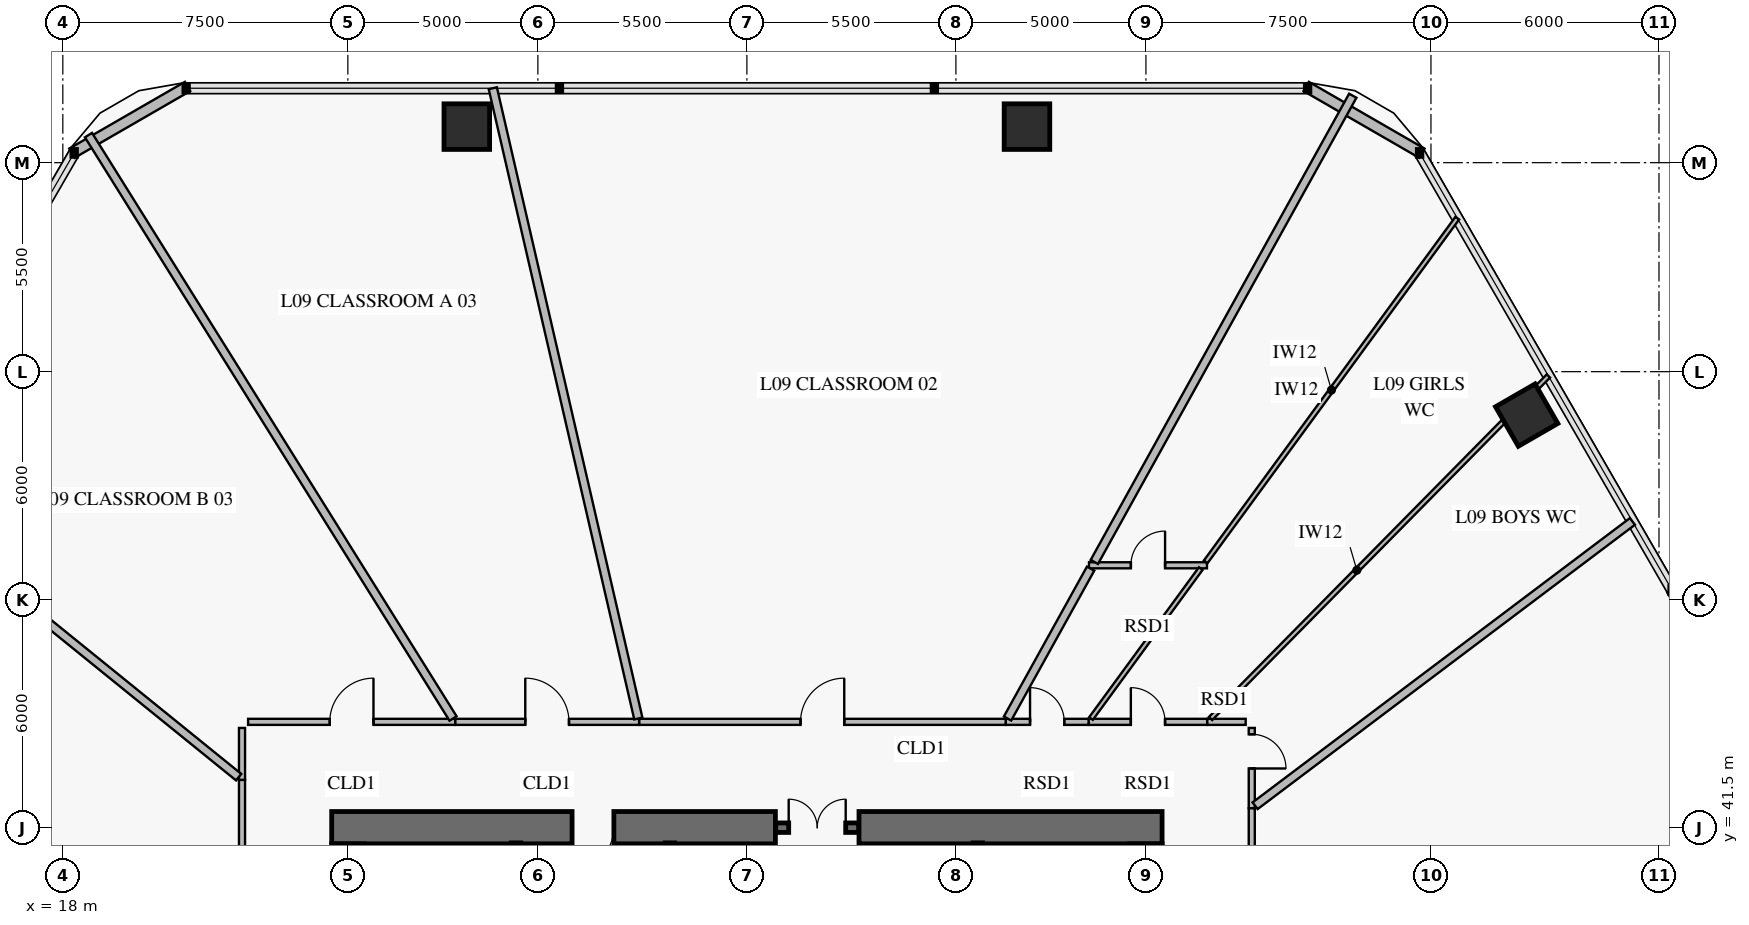
"""IFC4 building model, lengths in metres.
Left out: names, types, materials, properties, quantities, classifications, styles, units other than length and angle.
Written with IfcOpenShell. Run it as: python <this file> out.ifc"""

import sys

from ifc_helpers import new_model, si_unit, direction, frame, frame_2d, origin, origin_2d, place, context, subcontext, project, spatial, rectangle, extrude, element, fill, save


model = new_model("IFC4")
c1 = context("Model", 3, precision=1e-05, world=origin(), true_north=direction((0.0, 1.0)))
c2 = subcontext(c1, "Body", "Model", "MODEL_VIEW")
j1 = project(units=[si_unit("LENGTHUNIT", "METRE"), si_unit("PLANEANGLEUNIT", "RADIAN")], contexts=[c1])
p1 = place(None, origin())
s1 = spatial("IfcSite", under=j1, at=p1, CompositionType="ELEMENT")
p2 = place(p1, origin())
s2 = spatial("IfcBuilding", under=s1, at=p2, CompositionType="ELEMENT")
p3 = place(p2, frame((0.0, 0.0, 37.2)))
s3 = spatial("IfcBuildingStorey", under=s2, at=p3, CompositionType="ELEMENT", Elevation=37.2)
p4 = place(p3, frame((46.925, 41.5, 0.0), z_axis=(0.0, 0.0, 1.0), x_axis=(-1.0, 0.0, 0.0)))
e1 = element("IfcWall", 1, at=p4, inside=s3, PredefinedType="SHEAR", context=c2, shape_type="SweptSolid", body=[
    extrude(rectangle(XDim=7.975, YDim=0.85, at=frame_2d((3.988, 0.0))), origin(), (0.0, 0.0, 1.0), 4.2),
])
p5 = place(p3, frame((36.75, 41.5, 0.0), z_axis=(0.0, 0.0, 1.0), x_axis=(-1.0, 0.0, 0.0)))
e2 = element("IfcWall", 2, at=p5, inside=s3, PredefinedType="SHEAR", context=c2, shape_type="SweptSolid", body=[
    extrude(rectangle(XDim=11.675, YDim=0.85, at=frame_2d((5.837, 0.0))), origin(), (0.0, 0.0, 1.0), 4.2),
])
p6 = place(p5, frame((4.25, 0.0, 0.0)))
e3 = element("IfcOpeningElement", 3, at=p6, cuts=e2, PredefinedType="OPENING", context=c2, shape_type="SweptSolid", body=[
    extrude(rectangle(XDim=1.1, YDim=2.15, at=frame_2d((0.55, 1.075))), frame((0.0, 0.437, 0.0), z_axis=(0.0, -1.0, 0.0), x_axis=(1.0, 0.0, 0.0)), (0.0, 0.0, 1.0), 0.874),
])
p7 = place(p3, frame((25.5, 22.925, 0.0), z_axis=(0.0, 0.0, 1.0), x_axis=(0.0, 1.0, 0.0)))
e4 = element("IfcWall", 4, at=p7, inside=s3, PredefinedType="SHEAR", context=c2, shape_type="SweptSolid", body=[
    extrude(rectangle(XDim=18.15, YDim=0.85, at=frame_2d((9.075, 0.0))), origin(), (0.0, 0.0, 1.0), 4.2),
])
p8 = place(p7, frame((8.825, 0.0, 0.0)))
e5 = element("IfcOpeningElement", 5, at=p8, cuts=e4, PredefinedType="OPENING", context=c2, shape_type="SweptSolid", body=[
    extrude(rectangle(XDim=1.1, YDim=2.15, at=frame_2d((0.55, 1.075))), frame((0.0, 0.437, 0.0), z_axis=(0.0, -1.0, 0.0), x_axis=(1.0, 0.0, 0.0)), (0.0, 0.0, 1.0), 0.874),
])
p9 = place(p3, frame((46.5, 22.925, 0.0), z_axis=(0.0, 0.0, 1.0), x_axis=(0.0, 1.0, 0.0)))
e6 = element("IfcWall", 6, at=p9, inside=s3, PredefinedType="SHEAR", context=c2, shape_type="SweptSolid", body=[
    extrude(rectangle(XDim=18.15, YDim=0.85, at=frame_2d((9.075, 0.0))), origin(), (0.0, 0.0, 1.0), 4.2),
])
p10 = place(p9, frame((8.825, 0.0, 0.0)))
e7 = element("IfcOpeningElement", 7, at=p10, cuts=e6, PredefinedType="OPENING", context=c2, shape_type="SweptSolid", body=[
    extrude(rectangle(XDim=1.1, YDim=2.15, at=frame_2d((0.55, 1.075))), frame((0.0, 0.437, 0.0), z_axis=(0.0, -1.0, 0.0), x_axis=(1.0, 0.0, 0.0)), (0.0, 0.0, 1.0), 0.874),
])
for number, where, z_axis, x_axis in (
    (8, (56.519, 52.357, 0.0), (0.0, 0.0, 1.0), (-0.5, 0.866, 0.0)),
    (9, (43.37, 59.948, 0.0), (0.0, 0.0, 1.0), (-1.0, 0.0, 0.0)),
    (10, (28.63, 59.948, 0.0), (0.0, 0.0, 1.0), (-1.0, 0.0, 0.0)),
):
    element("IfcColumn", number, at=place(p3, frame(where, z_axis=z_axis, x_axis=x_axis)), inside=s3, PredefinedType="COLUMN", context=c2, shape_type="SweptSolid", body=[
        extrude(rectangle(XDim=1.2, YDim=1.2, at=origin_2d()), origin(), (0.0, 0.0, 1.0), 3.92),
    ])
for number, where, z_axis, x_axis in (
    (11, (18.239, 59.249, 0.0), (0.0, 0.0, 1.0), (0.866, 0.5, 0.0)),
    (12, (50.717, 61.006, 0.0), (0.0, 0.0, 1.0), (0.866, -0.5, 0.0)),
):
    element("IfcWall", number, at=place(p3, frame(where, z_axis=z_axis, x_axis=x_axis)), inside=s3, PredefinedType="SOLIDWALL", context=c2, shape_type="SweptSolid", body=[
        extrude(rectangle(XDim=3.515, YDim=0.28, at=frame_2d((1.757, 0.0))), origin(), (0.0, 0.0, 1.0), 3.92),
    ])
p11 = place(p3, frame((60.344, 47.752, 0.0), z_axis=(0.0, 0.0, 1.0), x_axis=(0.500024377727, -0.866011328839, 0.0)))
e13 = element("IfcWall", 13, at=p11, inside=s3, PredefinedType="SOLIDWALL", context=c2, shape_type="SweptSolid", body=[
    extrude(rectangle(XDim=2.94, YDim=0.28, at=frame_2d((1.47, 0.0))), origin(), (0.0, 0.0, 1.0), 3.92),
])
p12 = place(p11, frame((0.42, 0.0, 0.7)))
e14 = element("IfcOpeningElement", 14, at=p12, cuts=e13, PredefinedType="OPENING", context=c2, shape_type="SweptSolid", body=[
    extrude(rectangle(XDim=2.1, YDim=1.5, at=frame_2d((1.05, 0.75))), frame((0.0, 0.152, 0.0), z_axis=(0.0, -1.0, 0.0), x_axis=(1.0, 0.0, 0.0)), (0.0, 0.0, 1.0), 0.304),
])
p13 = place(p3, frame((36.76, 41.5, 0.0), z_axis=(0.0, 0.0, 1.0), x_axis=(1.0, 0.0, 0.0)))
e15 = element("IfcWall", 15, at=p13, inside=s3, PredefinedType="SOLIDWALL", context=c2, shape_type="SweptSolid", body=[
    extrude(rectangle(XDim=2.18, YDim=0.25, at=frame_2d((1.09, 0.0))), origin(), (0.0, 0.0, 1.0), 4.2),
])
p14 = place(p13, frame((0.34, 0.0, 0.0)))
e16 = element("IfcOpeningElement", 16, at=p14, cuts=e15, PredefinedType="OPENING", context=c2, shape_type="SweptSolid", body=[
    extrude(rectangle(XDim=1.5, YDim=2.15, at=frame_2d((0.75, 1.075))), frame((0.0, 0.137, 0.0), z_axis=(0.0, -1.0, 0.0), x_axis=(1.0, 0.0, 0.0)), (0.0, 0.0, 1.0), 0.274),
])
for number, where, z_axis, x_axis in (
    (17, (29.925, 31.4, 0.0), (0.0, 0.0, 1.0), (0.0, 1.0, 0.0)),
    (18, (33.975, 31.4, 0.0), (0.0, 0.0, 1.0), (0.0, 1.0, 0.0)),
    (19, (42.075, 31.4, 0.0), (0.0, 0.0, 1.0), (0.0, 1.0, 0.0)),
):
    element("IfcWall", number, at=place(p3, frame(where, z_axis=z_axis, x_axis=x_axis)), inside=s3, PredefinedType="SOLIDWALL", context=c2, shape_type="SweptSolid", body=[
        extrude(rectangle(XDim=9.7, YDim=0.25, at=frame_2d((4.85, 0.0))), origin(), (0.0, 0.0, 1.0), 4.2),
    ])
p15 = place(p3, frame((49.285, 42.011, 0.0), z_axis=(0.0, 0.0, 1.0), x_axis=(0.0, 1.0, 0.0)))
e20 = element("IfcWall", 20, at=p15, inside=s3, PredefinedType="PARTITIONING", context=c2, shape_type="SweptSolid", body=[
    extrude(rectangle(XDim=2.114, YDim=0.16, at=frame_2d((1.057, 0.0))), origin(), (0.0, 0.0, 1.0), 3.92),
])
p16 = place(p15, frame((1.047, 0.0, 0.0)))
e21 = element("IfcOpeningElement", 21, at=p16, cuts=e20, PredefinedType="OPENING", context=c2, shape_type="SweptSolid", body=[
    extrude(rectangle(XDim=0.9, YDim=2.1, at=frame_2d((0.45, 1.05))), frame((0.0, 0.092, 0.0), z_axis=(0.0, -1.0, 0.0), x_axis=(1.0, 0.0, 0.0)), (0.0, 0.0, 1.0), 0.184),
])
p17 = place(p3, frame((48.115, 44.285, 0.0), z_axis=(0.0, 0.0, 1.0), x_axis=(-1.0, 0.0, 0.0)))
e22 = element("IfcWall", 22, at=p17, inside=s3, PredefinedType="PARTITIONING", context=c2, shape_type="SweptSolid", body=[
    extrude(rectangle(XDim=3.124, YDim=0.16, at=frame_2d((1.562, 0.0))), origin(), (0.0, 0.0, 1.0), 3.92),
])
p18 = place(p17, frame((1.112, 0.0, 0.0)))
e23 = element("IfcOpeningElement", 23, at=p18, cuts=e22, PredefinedType="OPENING", context=c2, shape_type="SweptSolid", body=[
    extrude(rectangle(XDim=0.9, YDim=2.1, at=frame_2d((0.45, 1.05))), frame((0.0, 0.092, 0.0), z_axis=(0.0, -1.0, 0.0), x_axis=(1.0, 0.0, 0.0)), (0.0, 0.0, 1.0), 0.184),
])
p19 = place(p3, frame((45.002, 48.405, 0.0), z_axis=(0.0, 0.0, 1.0), x_axis=(1.0, 0.0, 0.0)))
e24 = element("IfcWall", 24, at=p19, inside=s3, PredefinedType="PARTITIONING", context=c2, shape_type="SweptSolid", body=[
    extrude(rectangle(XDim=3.104, YDim=0.16, at=frame_2d((1.552, 0.0))), origin(), (0.0, 0.0, 1.0), 3.92),
])
p20 = place(p19, frame((1.102, 0.0, 0.0)))
e25 = element("IfcOpeningElement", 25, at=p20, cuts=e24, PredefinedType="OPENING", context=c2, shape_type="SweptSolid", body=[
    extrude(rectangle(XDim=0.9, YDim=2.1, at=frame_2d((0.45, 1.05))), frame((0.0, 0.092, 0.0), z_axis=(0.0, -1.0, 0.0), x_axis=(1.0, 0.0, 0.0)), (0.0, 0.0, 1.0), 0.184),
])
p21 = place(p3, frame((44.991, 44.285, 0.0), z_axis=(0.0, 0.0, 1.0), x_axis=(-1.0, 0.0, 0.0)))
e26 = element("IfcWall", 26, at=p21, inside=s3, PredefinedType="PARTITIONING", context=c2, shape_type="SweptSolid", body=[
    extrude(rectangle(XDim=2.181, YDim=0.16, at=frame_2d((1.091, 0.0))), origin(), (0.0, 0.0, 1.0), 3.92),
])
p22 = place(p21, frame((0.641, 0.0, 0.0)))
e27 = element("IfcOpeningElement", 27, at=p22, cuts=e26, PredefinedType="OPENING", context=c2, shape_type="SweptSolid", body=[
    extrude(rectangle(XDim=0.9, YDim=2.1, at=frame_2d((0.45, 1.05))), frame((0.0, 0.092, 0.0), z_axis=(0.0, -1.0, 0.0), x_axis=(1.0, 0.0, 0.0)), (0.0, 0.0, 1.0), 0.184),
])
p23 = place(p3, frame((42.81, 44.285, 0.0), z_axis=(0.0, 0.0, 1.0), x_axis=(-1.0, 0.0, 0.0)))
e28 = element("IfcWall", 28, at=p23, inside=s3, PredefinedType="PARTITIONING", context=c2, shape_type="SweptSolid", body=[
    extrude(rectangle(XDim=9.646, YDim=0.16, at=frame_2d((4.823, 0.0))), origin(), (0.0, 0.0, 1.0), 3.22),
])
p24 = place(p23, frame((4.248, 0.0, 0.0)))
e29 = element("IfcOpeningElement", 29, at=p24, cuts=e28, PredefinedType="OPENING", context=c2, shape_type="SweptSolid", body=[
    extrude(rectangle(XDim=1.15, YDim=2.2, at=frame_2d((0.575, 1.1))), frame((0.0, 0.092, 0.0), z_axis=(0.0, -1.0, 0.0), x_axis=(1.0, 0.0, 0.0)), (0.0, 0.0, 1.0), 0.184),
])
p25 = place(p3, frame((33.164, 44.285, 0.0), z_axis=(0.0, 0.0, 1.0), x_axis=(-1.0, 0.0, 0.0)))
e30 = element("IfcWall", 30, at=p25, inside=s3, PredefinedType="PARTITIONING", context=c2, shape_type="SweptSolid", body=[
    extrude(rectangle(XDim=4.84, YDim=0.16, at=frame_2d((2.42, 0.0))), origin(), (0.0, 0.0, 1.0), 3.22),
])
p26 = place(p25, frame((1.845, 0.0, 0.0)))
e31 = element("IfcOpeningElement", 31, at=p26, cuts=e30, PredefinedType="OPENING", context=c2, shape_type="SweptSolid", body=[
    extrude(rectangle(XDim=1.15, YDim=2.2, at=frame_2d((0.575, 1.1))), frame((0.0, 0.092, 0.0), z_axis=(0.0, -1.0, 0.0), x_axis=(1.0, 0.0, 0.0)), (0.0, 0.0, 1.0), 0.184),
])
p27 = place(p3, frame((28.323, 44.285, 0.0), z_axis=(0.0, 0.0, 1.0), x_axis=(-1.0, 0.0, 0.0)))
e32 = element("IfcWall", 32, at=p27, inside=s3, PredefinedType="PARTITIONING", context=c2, shape_type="SweptSolid", body=[
    extrude(rectangle(XDim=5.448, YDim=0.16, at=frame_2d((2.724, 0.0))), origin(), (0.0, 0.0, 1.0), 3.22),
])
p28 = place(p27, frame((2.149, 0.0, 0.0)))
e33 = element("IfcOpeningElement", 33, at=p28, cuts=e32, PredefinedType="OPENING", context=c2, shape_type="SweptSolid", body=[
    extrude(rectangle(XDim=1.15, YDim=2.2, at=frame_2d((0.575, 1.1))), frame((0.0, 0.092, 0.0), z_axis=(0.0, -1.0, 0.0), x_axis=(1.0, 0.0, 0.0)), (0.0, 0.0, 1.0), 0.184),
])
p29 = place(p3, frame((22.715, 42.758, 0.0), z_axis=(0.0, 0.0, 1.0), x_axis=(0.0, -1.0, 0.0)))
e34 = element("IfcWall", 34, at=p29, inside=s3, PredefinedType="PARTITIONING", context=c2, shape_type="SweptSolid", body=[
    extrude(rectangle(XDim=11.454, YDim=0.16, at=frame_2d((5.727, 0.0))), origin(), (0.0, 0.0, 1.0), 3.22),
])
p30 = place(p29, frame((5.152, 0.0, 0.0)))
e35 = element("IfcOpeningElement", 35, at=p30, cuts=e34, PredefinedType="OPENING", context=c2, shape_type="SweptSolid", body=[
    extrude(rectangle(XDim=1.15, YDim=2.2, at=frame_2d((0.575, 1.1))), frame((0.0, 0.092, 0.0), z_axis=(0.0, -1.0, 0.0), x_axis=(1.0, 0.0, 0.0)), (0.0, 0.0, 1.0), 0.184),
])
p31 = place(p3, frame((49.285, 29.896, 0.0), z_axis=(0.0, 0.0, 1.0), x_axis=(0.0, 1.0, 0.0)))
e36 = element("IfcWall", 36, at=p31, inside=s3, PredefinedType="PARTITIONING", context=c2, shape_type="SweptSolid", body=[
    extrude(rectangle(XDim=12.115, YDim=0.16, at=frame_2d((6.058, 0.0))), origin(), (0.0, 0.0, 1.0), 3.22),
])
p32 = place(p31, frame((5.583, 0.0, 0.0)))
e37 = element("IfcOpeningElement", 37, at=p32, cuts=e36, PredefinedType="OPENING", context=c2, shape_type="SweptSolid", body=[
    extrude(rectangle(XDim=0.95, YDim=2.1, at=frame_2d((0.475, 1.05))), frame((0.0, 0.092, 0.0), z_axis=(0.0, -1.0, 0.0), x_axis=(1.0, 0.0, 0.0)), (0.0, 0.0, 1.0), 0.184),
])
p33 = place(p3, frame((49.373, 42.077, 0.0), z_axis=(0.0, 0.0, 1.0), x_axis=(0.798630996951, 0.601821012187, 0.0)))
e38 = element("IfcWall", 38, at=p33, inside=s3, PredefinedType="PARTITIONING", context=c2, shape_type="SweptSolid", body=[
    extrude(rectangle(XDim=12.431, YDim=0.22, at=frame_2d((6.215, 0.0))), origin(), (0.0, 0.0, 1.0), 3.17),
])
p34 = place(p3, frame((49.125, 44.285, 0.0), z_axis=(0.0, 0.0, 1.0), x_axis=(-1.0, 0.0, 0.0)))
e39 = element("IfcWall", 39, at=p34, inside=s3, PredefinedType="PARTITIONING", context=c2, shape_type="SweptSolid", body=[
    extrude(rectangle(XDim=1.01, YDim=0.16, at=frame_2d((0.505, 0.0))), origin(), (0.0, 0.0, 1.0), 3.22),
])
p35 = place(p3, frame((48.201, 44.373, 0.0), z_axis=(0.0, 0.0, 1.0), x_axis=(0.702156728527, 0.712022421405, 0.0)))
e40 = element("IfcWall", 40, at=p35, inside=s3, PredefinedType="PARTITIONING", context=c2, shape_type="SweptSolid", body=[
    extrude(rectangle(XDim=10.963, YDim=0.12, at=frame_2d((5.481, 0.0))), origin(), (0.0, 0.0, 1.0), 3.22),
])
p36 = place(p3, frame((56.686, 52.977, 0.0), z_axis=(0.0, 0.0, 1.0), x_axis=(0.702004585151, 0.712172424646, 0.0)))
e41 = element("IfcWall", 41, at=p36, inside=s3, PredefinedType="PARTITIONING", context=c2, shape_type="SweptSolid", body=[
    extrude(rectangle(XDim=0.576, YDim=0.12, at=frame_2d((0.288, 0.0))), origin(), (0.0, 0.0, 1.0), 3.492),
])
p37 = place(p3, frame((45.056, 44.373, 0.0), z_axis=(0.0, 0.0, 1.0), x_axis=(0.590607595118, 0.806958901425, 0.0)))
e42 = element("IfcWall", 42, at=p37, inside=s3, PredefinedType="PARTITIONING", context=c2, shape_type="SweptSolid", body=[
    extrude(rectangle(XDim=4.887, YDim=0.12, at=frame_2d((2.444, 0.0))), origin(), (0.0, 0.0, 1.0), 3.92),
])
p38 = place(p3, frame((48.071, 48.493, 0.0), z_axis=(0.0, 0.0, 1.0), x_axis=(0.590600620108, 0.80696400634, 0.0)))
e43 = element("IfcWall", 43, at=p38, inside=s3, PredefinedType="PARTITIONING", context=c2, shape_type="SweptSolid", body=[
    extrude(rectangle(XDim=11.212, YDim=0.12, at=frame_2d((5.606, 0.0))), origin(), (0.0, 0.0, 1.0), 3.17),
])
p39 = place(p3, frame((42.858, 44.373, 0.0), z_axis=(0.0, 0.0, 1.0), x_axis=(0.484838262691, 0.87460382976, 0.0)))
e44 = element("IfcWall", 44, at=p39, inside=s3, PredefinedType="PARTITIONING", context=c2, shape_type="SweptSolid", body=[
    extrude(rectangle(XDim=4.509, YDim=0.22, at=frame_2d((2.255, 0.0))), origin(), (0.0, 0.0, 1.0), 3.92),
])
p40 = place(p3, frame((45.142, 48.493, 0.0), z_axis=(0.0, 0.0, 1.0), x_axis=(0.484815156974, 0.874616638058, 0.0)))
e45 = element("IfcWall", 45, at=p40, inside=s3, PredefinedType="PARTITIONING", context=c2, shape_type="SweptSolid", body=[
    extrude(rectangle(XDim=14.027, YDim=0.22, at=frame_2d((7.014, 0.0))), origin(), (0.0, 0.0, 1.0), 3.17),
])
p41 = place(p3, frame((33.144, 44.373, 0.0), z_axis=(0.0, 0.0, 1.0), x_axis=(-0.224953781902, 0.974369435075, 0.0)))
e46 = element("IfcWall", 46, at=p41, inside=s3, PredefinedType="PARTITIONING", context=c2, shape_type="SweptSolid", body=[
    extrude(rectangle(XDim=17.022, YDim=0.22, at=frame_2d((8.511, 0.0))), origin(), (0.0, 0.0, 1.0), 3.17),
])
p42 = place(p3, frame((28.269, 44.373, 0.0), z_axis=(0.0, 0.0, 1.0), x_axis=(-0.529928627855, 0.848042245044, 0.0)))
e47 = element("IfcWall", 47, at=p42, inside=s3, PredefinedType="PARTITIONING", context=c2, shape_type="SweptSolid", body=[
    extrude(rectangle(XDim=18.103, YDim=0.22, at=frame_2d((9.052, 0.0))), origin(), (0.0, 0.0, 1.0), 3.17),
])
p43 = place(p3, frame((22.715, 44.125, 0.0), z_axis=(0.0, 0.0, 1.0), x_axis=(0.0, -1.0, 0.0)))
e48 = element("IfcWall", 48, at=p43, inside=s3, PredefinedType="PARTITIONING", context=c2, shape_type="SweptSolid", body=[
    extrude(rectangle(XDim=1.367, YDim=0.16, at=frame_2d((0.684, 0.0))), origin(), (0.0, 0.0, 1.0), 3.92),
])
p44 = place(p3, frame((22.627, 42.829, 0.0), z_axis=(0.0, 0.0, 1.0), x_axis=(-0.777142055765, 0.629325214147, 0.0)))
e49 = element("IfcWall", 49, at=p44, inside=s3, PredefinedType="PARTITIONING", context=c2, shape_type="SweptSolid", body=[
    extrude(rectangle(XDim=12.112, YDim=0.22, at=frame_2d((6.056, 0.0))), origin(), (0.0, 0.0, 1.0), 3.17),
])
p45 = place(p6, origin())
e50 = element("IfcDoor", 50, at=p45, inside=s3, OperationType="SINGLE_SWING_RIGHT", PredefinedType="USERDEFINED", context=c2, shape_type="SweptSolid", body=[
    extrude(rectangle(XDim=1.1, YDim=2.15, at=frame_2d((0.55, 1.075))), frame((0.0, 0.025, 0.0), z_axis=(0.0, -1.0, 0.0), x_axis=(1.0, 0.0, 0.0)), (0.0, 0.0, 1.0), 0.05),
])
fill(e3, e50)
p46 = place(p14, origin())
e51 = element("IfcDoor", 51, at=p46, inside=s3, OperationType="DOUBLE_DOOR_SINGLE_SWING", PredefinedType="DOOR", context=c2, shape_type="SweptSolid", body=[
    extrude(rectangle(XDim=1.5, YDim=2.15, at=frame_2d((0.75, 1.075))), frame((0.0, 0.025, 0.0), z_axis=(0.0, -1.0, 0.0), x_axis=(1.0, 0.0, 0.0)), (0.0, 0.0, 1.0), 0.05),
])
fill(e16, e51)
p47 = place(p16, frame((0.9, 0.0, 0.0), z_axis=(0.0, 0.0, 1.0), x_axis=(-1.0, 0.0, 0.0)))
e52 = element("IfcDoor", 52, at=p47, inside=s3, OperationType="SINGLE_SWING_RIGHT", PredefinedType="DOOR", context=c2, shape_type="SweptSolid", body=[
    extrude(rectangle(XDim=0.9, YDim=2.1, at=frame_2d((0.45, 1.05))), frame((0.0, 0.025, 0.0), z_axis=(0.0, -1.0, 0.0), x_axis=(1.0, 0.0, 0.0)), (0.0, 0.0, 1.0), 0.05),
])
fill(e21, e52)
p48 = place(p18, frame((0.9, 0.0, 0.0), z_axis=(0.0, 0.0, 1.0), x_axis=(-1.0, 0.0, 0.0)))
e53 = element("IfcDoor", 53, at=p48, inside=s3, OperationType="SINGLE_SWING_LEFT", PredefinedType="DOOR", context=c2, shape_type="SweptSolid", body=[
    extrude(rectangle(XDim=0.9, YDim=2.1, at=frame_2d((0.45, 1.05))), frame((0.0, 0.025, 0.0), z_axis=(0.0, -1.0, 0.0), x_axis=(1.0, 0.0, 0.0)), (0.0, 0.0, 1.0), 0.05),
])
fill(e23, e53)
p49 = place(p20, origin())
e54 = element("IfcDoor", 54, at=p49, inside=s3, OperationType="SINGLE_SWING_RIGHT", PredefinedType="DOOR", context=c2, shape_type="SweptSolid", body=[
    extrude(rectangle(XDim=0.9, YDim=2.1, at=frame_2d((0.45, 1.05))), frame((0.0, 0.025, 0.0), z_axis=(0.0, -1.0, 0.0), x_axis=(1.0, 0.0, 0.0)), (0.0, 0.0, 1.0), 0.05),
])
fill(e25, e54)
p50 = place(p22, frame((0.9, 0.0, 0.0), z_axis=(0.0, 0.0, 1.0), x_axis=(-1.0, 0.0, 0.0)))
e55 = element("IfcDoor", 55, at=p50, inside=s3, OperationType="SINGLE_SWING_LEFT", PredefinedType="DOOR", context=c2, shape_type="SweptSolid", body=[
    extrude(rectangle(XDim=0.9, YDim=2.1, at=frame_2d((0.45, 1.05))), frame((0.0, 0.025, 0.0), z_axis=(0.0, -1.0, 0.0), x_axis=(1.0, 0.0, 0.0)), (0.0, 0.0, 1.0), 0.05),
])
fill(e27, e55)
p51 = place(p24, frame((1.15, 0.0, 0.0), z_axis=(0.0, 0.0, 1.0), x_axis=(-1.0, 0.0, 0.0)))
e56 = element("IfcDoor", 56, at=p51, inside=s3, OperationType="SINGLE_SWING_RIGHT", PredefinedType="DOOR", context=c2, shape_type="SweptSolid", body=[
    extrude(rectangle(XDim=1.15, YDim=2.2, at=frame_2d((0.575, 1.1))), frame((0.0, 0.025, 0.0), z_axis=(0.0, -1.0, 0.0), x_axis=(1.0, 0.0, 0.0)), (0.0, 0.0, 1.0), 0.05),
])
fill(e29, e56)
p52 = place(p26, frame((1.15, 0.0, 0.0), z_axis=(0.0, 0.0, 1.0), x_axis=(-1.0, 0.0, 0.0)))
e57 = element("IfcDoor", 57, at=p52, inside=s3, OperationType="SINGLE_SWING_LEFT", PredefinedType="DOOR", context=c2, shape_type="SweptSolid", body=[
    extrude(rectangle(XDim=1.15, YDim=2.2, at=frame_2d((0.575, 1.1))), frame((0.0, 0.025, 0.0), z_axis=(0.0, -1.0, 0.0), x_axis=(1.0, 0.0, 0.0)), (0.0, 0.0, 1.0), 0.05),
])
fill(e31, e57)
p53 = place(p28, frame((1.15, 0.0, 0.0), z_axis=(0.0, 0.0, 1.0), x_axis=(-1.0, 0.0, 0.0)))
e58 = element("IfcDoor", 58, at=p53, inside=s3, OperationType="SINGLE_SWING_RIGHT", PredefinedType="DOOR", context=c2, shape_type="SweptSolid", body=[
    extrude(rectangle(XDim=1.15, YDim=2.2, at=frame_2d((0.575, 1.1))), frame((0.0, 0.025, 0.0), z_axis=(0.0, -1.0, 0.0), x_axis=(1.0, 0.0, 0.0)), (0.0, 0.0, 1.0), 0.05),
])
fill(e33, e58)
save(model, sys.argv[1])
